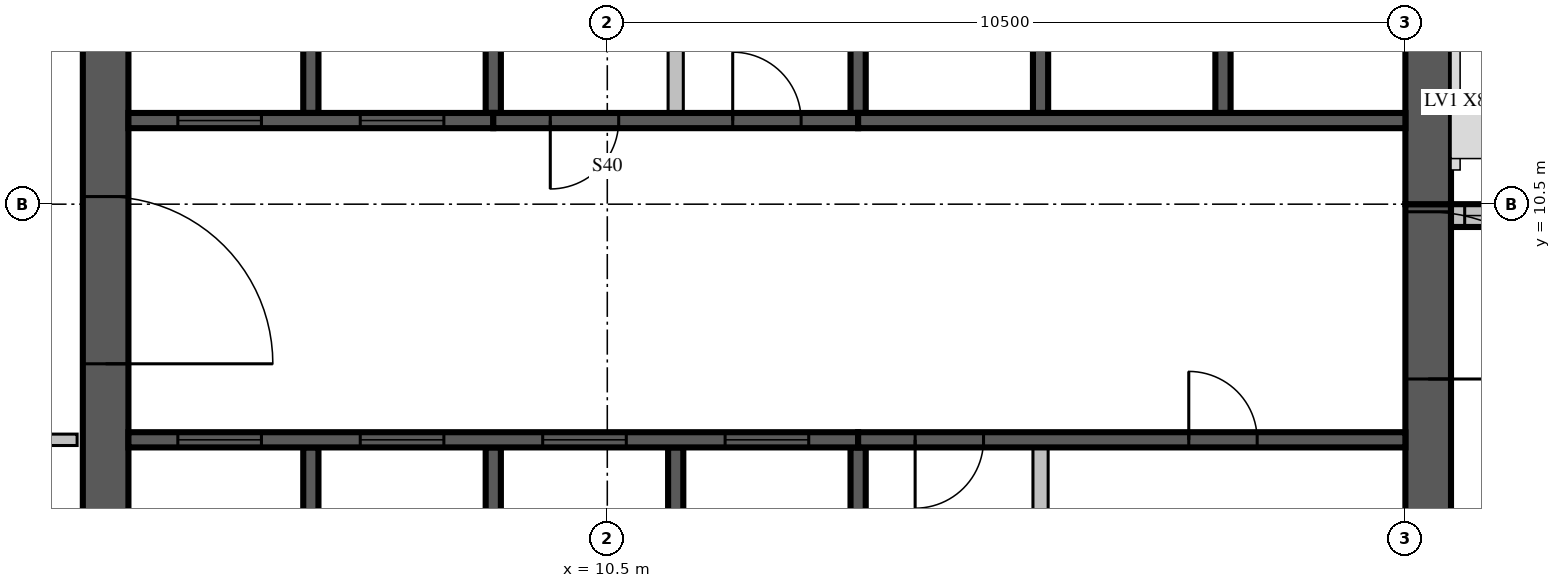
"""IFC4 building model, lengths in metres.
Left out: names, types, materials, properties, quantities, classifications, styles, units other than length and angle.
Written with IfcOpenShell. Run it as: python <this file> out.ifc"""

import sys

from ifc_helpers import new_model, si_unit, direction, frame, frame_2d, origin, place, context, subcontext, project, spatial, rectangle, extrude, source, transform, mapped, element, fill, save


model = new_model("IFC4")
c1 = context("Model", 3, precision=1e-05, world=origin(), true_north=direction((0.0, 1.0)))
c2 = subcontext(c1, "Body", "Model", "MODEL_VIEW")
j1 = project(units=[si_unit("LENGTHUNIT", "METRE"), si_unit("PLANEANGLEUNIT", "RADIAN")], contexts=[c1])
p1 = place(None, origin())
s1 = spatial("IfcSite", under=j1, at=p1, CompositionType="ELEMENT")
p2 = place(p1, origin())
s2 = spatial("IfcBuilding", under=s1, at=p2, CompositionType="ELEMENT")
p3 = place(p2, frame((0.0, 0.0, 354.5)))
s3 = spatial("IfcBuildingStorey", under=s2, at=p3, CompositionType="ELEMENT", Elevation=354.5)
m1 = source(origin(), c2, "Body", "SweptSolid", [
    extrude(rectangle(XDim=17.4, YDim=0.6, at=frame_2d((8.7, 0.0))), origin(), (0.0, 0.0, 1.0), 3.5),
])
p4 = place(p3, frame((3.9, 4.2, 0.0), z_axis=(0.0, 0.0, 1.0), x_axis=(0.0, 1.0, 0.0)))
e1 = element("IfcWall", 1, at=p4, inside=s3, PredefinedType="SHEAR", context=c2, shape_type="MappedRepresentation", body=[
    mapped(m1, transform((0.0, 0.0, 0.0), scale=1.0)),
])
m2 = source(origin(), c2, "Body", "SweptSolid", [
    extrude(rectangle(XDim=2.2, YDim=2.1, at=frame_2d((1.1, 1.05))), frame((0.0, 0.31, 0.0), z_axis=(0.0, -1.0, 0.0), x_axis=(1.0, 0.0, 0.0)), (0.0, 0.0, 1.0), 0.62),
])
p5 = place(p4, frame((4.2, 0.0, 0.0)))
e2 = element("IfcOpeningElement", 2, at=p5, cuts=e1, PredefinedType="OPENING", context=c2, shape_type="MappedRepresentation", body=[
    mapped(m2, transform((0.0, 0.0, 0.0), scale=1.0)),
])
m3 = source(origin(), c2, "Body", "SweptSolid", [
    extrude(rectangle(XDim=6.3, YDim=0.6, at=frame_2d((3.15, 0.0))), origin(), (0.0, 0.0, 1.0), 3.5),
])
p6 = place(p3, frame((21.3, 4.2, 0.0), z_axis=(0.0, 0.0, 1.0), x_axis=(0.0, 1.0, 0.0)))
e3 = element("IfcWall", 3, at=p6, inside=s3, PredefinedType="SHEAR", context=c2, shape_type="MappedRepresentation", body=[
    mapped(m3, transform((0.0, 0.0, 0.0), scale=1.0)),
])
p7 = place(p6, frame((4.0, 0.0, 0.0)))
e4 = element("IfcOpeningElement", 4, at=p7, cuts=e3, PredefinedType="OPENING", context=c2, shape_type="MappedRepresentation", body=[
    mapped(m2, transform((0.0, 0.0, 0.0), scale=1.0)),
])
m4 = source(origin(), c2, "Body", "SweptSolid", [
    extrude(rectangle(XDim=10.5, YDim=0.6, at=frame_2d((5.25, 0.0))), origin(), (0.0, 0.0, 1.0), 3.5),
])
p8 = place(p3, frame((21.3, 10.5, 0.0), z_axis=(0.0, 0.0, 1.0), x_axis=(0.0, 1.0, 0.0)))
e5 = element("IfcWall", 5, at=p8, inside=s3, PredefinedType="SHEAR", context=c2, shape_type="MappedRepresentation", body=[
    mapped(m4, transform((0.0, 0.0, 0.0), scale=1.0)),
])
m5 = source(origin(), c2, "Body", "SweptSolid", [
    extrude(rectangle(XDim=1.2, YDim=2.4, at=frame_2d((0.6, 1.2))), frame((0.0, 0.31, 0.0), z_axis=(0.0, -1.0, 0.0), x_axis=(1.0, 0.0, 0.0)), (0.0, 0.0, 1.0), 0.62),
])
p9 = place(p8, frame((5.7, 0.0, 0.6)))
e6 = element("IfcOpeningElement", 6, at=p9, cuts=e5, PredefinedType="OPENING", context=c2, shape_type="MappedRepresentation", body=[
    mapped(m5, transform((0.0, 0.0, 0.0), scale=1.0)),
])
m6 = source(origin(), c2, "Body", "SweptSolid", [
    extrude(rectangle(XDim=7.5, YDim=0.3, at=frame_2d((3.75, 0.0))), origin(), (0.0, 0.0, 1.0), 3.1),
])
p10 = place(p3, frame((29.1, 10.35, 0.0), z_axis=(0.0, 0.0, 1.0), x_axis=(-1.0, 0.0, 0.0)))
e7 = element("IfcWall", 7, at=p10, inside=s3, PredefinedType="STANDARD", context=c2, shape_type="MappedRepresentation", body=[
    mapped(m6, transform((0.0, 0.0, 0.0), scale=1.0)),
])
m7 = source(origin(), c2, "Body", "SweptSolid", [
    extrude(rectangle(XDim=3.0, YDim=2.0, at=frame_2d((1.5, 1.0))), frame((0.0, 0.16, 0.0), z_axis=(0.0, -1.0, 0.0), x_axis=(1.0, 0.0, 0.0)), (0.0, 0.0, 1.0), 0.32),
])
p11 = place(p10, frame((1.14, 0.0, 0.6)))
e8 = element("IfcOpeningElement", 8, at=p11, cuts=e7, PredefinedType="OPENING", context=c2, shape_type="MappedRepresentation", body=[
    mapped(m7, transform((0.0, 0.0, 0.0), scale=1.0)),
])
m8 = source(origin(), c2, "Body", "SweptSolid", [
    extrude(rectangle(XDim=1.8, YDim=2.0, at=frame_2d((0.9, 1.0))), frame((0.0, 0.16, 0.0), z_axis=(0.0, -1.0, 0.0), x_axis=(1.0, 0.0, 0.0)), (0.0, 0.0, 1.0), 0.32),
])
p12 = place(p10, frame((5.52, 0.0, 0.6)))
e9 = element("IfcOpeningElement", 9, at=p12, cuts=e7, PredefinedType="OPENING", context=c2, shape_type="MappedRepresentation", body=[
    mapped(m8, transform((0.0, 0.0, 0.0), scale=1.0)),
])
m9 = source(origin(), c2, "Body", "SweptSolid", [
    extrude(rectangle(XDim=3.1, YDim=0.2, at=frame_2d((1.55, 0.0))), origin(), (0.0, 0.0, 1.0), 3.5),
])
for number, where, z_axis, x_axis in (
    (10, (6.6, 4.2, 0.0), (0.0, 0.0, 1.0), (0.0, 1.0, 0.0)),
    (11, (9.0, 4.2, 0.0), (0.0, 0.0, 1.0), (0.0, 1.0, 0.0)),
    (12, (11.4, 4.2, 0.0), (0.0, 0.0, 1.0), (0.0, 1.0, 0.0)),
):
    element("IfcWall", number, at=place(p3, frame(where, z_axis=z_axis, x_axis=x_axis)), inside=s3, PredefinedType="SOLIDWALL", context=c2, shape_type="MappedRepresentation", body=[
        mapped(m9, transform((0.0, 0.0, 0.0), scale=1.0)),
    ])
m10 = source(origin(), c2, "Body", "SweptSolid", [
    extrude(rectangle(XDim=3.1, YDim=0.2, at=frame_2d((1.55, 0.0))), origin(), (0.0, 0.0, 1.0), 3.1),
])
p13 = place(p3, frame((13.8, 4.2, 0.0), z_axis=(0.0, 0.0, 1.0), x_axis=(0.0, 1.0, 0.0)))
e13 = element("IfcWall", 13, at=p13, inside=s3, PredefinedType="SOLIDWALL", context=c2, shape_type="MappedRepresentation", body=[
    mapped(m10, transform((0.0, 0.0, 0.0), scale=1.0)),
])
m11 = source(origin(), c2, "Body", "SweptSolid", [
    extrude(rectangle(XDim=3.1, YDim=0.2, at=frame_2d((1.55, 0.0))), origin(), (0.0, 0.0, 1.0), 3.1),
])
p14 = place(p3, frame((16.2, 4.2, 0.0), z_axis=(0.0, 0.0, 1.0), x_axis=(0.0, 1.0, 0.0)))
e14 = element("IfcWall", 14, at=p14, inside=s3, PredefinedType="PARTITIONING", context=c2, shape_type="MappedRepresentation", body=[
    mapped(m11, transform((0.0, 0.0, 0.0), scale=1.0)),
])
m12 = source(origin(), c2, "Body", "SweptSolid", [
    extrude(rectangle(XDim=3.0, YDim=0.2, at=frame_2d((1.5, 0.0))), origin(), (0.0, 0.0, 1.0), 3.5),
])
p15 = place(p3, frame((6.6, 11.7, 0.0), z_axis=(0.0, 0.0, 1.0), x_axis=(0.0, 1.0, 0.0)))
e15 = element("IfcWall", 15, at=p15, inside=s3, PredefinedType="SOLIDWALL", context=c2, shape_type="MappedRepresentation", body=[
    mapped(m12, transform((0.0, 0.0, 0.0), scale=1.0)),
])
m13 = source(origin(), c2, "Body", "SweptSolid", [
    extrude(rectangle(XDim=3.0, YDim=0.2, at=frame_2d((1.5, 0.0))), origin(), (0.0, 0.0, 1.0), 3.1),
])
for number, where, z_axis, x_axis in (
    (16, (9.0, 11.7, 0.0), (0.0, 0.0, 1.0), (0.0, 1.0, 0.0)),
    (17, (13.8, 11.7, 0.0), (0.0, 0.0, 1.0), (0.0, 1.0, 0.0)),
):
    element("IfcWall", number, at=place(p3, frame(where, z_axis=z_axis, x_axis=x_axis)), inside=s3, PredefinedType="SOLIDWALL", context=c2, shape_type="MappedRepresentation", body=[
        mapped(m13, transform((0.0, 0.0, 0.0), scale=1.0)),
    ])
for number, where, z_axis, x_axis in (
    (18, (16.2, 11.7, 0.0), (0.0, 0.0, 1.0), (0.0, 1.0, 0.0)),
    (19, (18.6, 11.7, 0.0), (0.0, 0.0, 1.0), (0.0, 1.0, 0.0)),
):
    element("IfcWall", number, at=place(p3, frame(where, z_axis=z_axis, x_axis=x_axis)), inside=s3, PredefinedType="SOLIDWALL", context=c2, shape_type="MappedRepresentation", body=[
        mapped(m12, transform((0.0, 0.0, 0.0), scale=1.0)),
    ])
m14 = source(origin(), c2, "Body", "SweptSolid", [
    extrude(rectangle(XDim=3.0, YDim=0.2, at=frame_2d((1.5, 0.0))), origin(), (0.0, 0.0, 1.0), 3.1),
])
p16 = place(p3, frame((11.4, 11.7, 0.0), z_axis=(0.0, 0.0, 1.0), x_axis=(0.0, 1.0, 0.0)))
e20 = element("IfcWall", 20, at=p16, inside=s3, PredefinedType="PARTITIONING", context=c2, shape_type="MappedRepresentation", body=[
    mapped(m14, transform((0.0, 0.0, 0.0), scale=1.0)),
])
m15 = source(origin(), c2, "Body", "SweptSolid", [
    extrude(rectangle(XDim=9.6, YDim=0.2, at=frame_2d((4.8, 0.0))), origin(), (0.0, 0.0, 1.0), 3.5),
])
p17 = place(p3, frame((4.2, 7.4, 0.0), z_axis=(0.0, 0.0, 1.0), x_axis=(1.0, 0.0, 0.0)))
e21 = element("IfcWall", 21, at=p17, inside=s3, PredefinedType="SOLIDWALL", context=c2, shape_type="MappedRepresentation", body=[
    mapped(m15, transform((0.0, 0.0, 0.0), scale=1.0)),
])
m16 = source(origin(), c2, "Body", "SweptSolid", [
    extrude(rectangle(XDim=1.1, YDim=2.1, at=frame_2d((0.55, 1.05))), frame((0.0, 0.11, 0.0), z_axis=(0.0, -1.0, 0.0), x_axis=(1.0, 0.0, 0.0)), (0.0, 0.0, 1.0), 0.22),
])
p18 = place(p17, frame((0.65, 0.0, 0.0)))
e22 = element("IfcOpeningElement", 22, at=p18, cuts=e21, PredefinedType="OPENING", context=c2, shape_type="MappedRepresentation", body=[
    mapped(m16, transform((0.0, 0.0, 0.0), scale=1.0)),
])
p19 = place(p17, frame((3.05, 0.0, 0.0)))
e23 = element("IfcOpeningElement", 23, at=p19, cuts=e21, PredefinedType="OPENING", context=c2, shape_type="MappedRepresentation", body=[
    mapped(m16, transform((0.0, 0.0, 0.0), scale=1.0)),
])
p20 = place(p17, frame((5.45, 0.0, 0.0)))
e24 = element("IfcOpeningElement", 24, at=p20, cuts=e21, PredefinedType="OPENING", context=c2, shape_type="MappedRepresentation", body=[
    mapped(m16, transform((0.0, 0.0, 0.0), scale=1.0)),
])
p21 = place(p17, frame((7.85, 0.0, 0.0)))
e25 = element("IfcOpeningElement", 25, at=p21, cuts=e21, PredefinedType="OPENING", context=c2, shape_type="MappedRepresentation", body=[
    mapped(m16, transform((0.0, 0.0, 0.0), scale=1.0)),
])
m17 = source(origin(), c2, "Body", "SweptSolid", [
    extrude(rectangle(XDim=7.2, YDim=0.2, at=frame_2d((3.6, 0.0))), origin(), (0.0, 0.0, 1.0), 3.1),
])
p22 = place(p3, frame((13.8, 7.4, 0.0), z_axis=(0.0, 0.0, 1.0), x_axis=(1.0, 0.0, 0.0)))
e26 = element("IfcWall", 26, at=p22, inside=s3, PredefinedType="SOLIDWALL", context=c2, shape_type="MappedRepresentation", body=[
    mapped(m17, transform((0.0, 0.0, 0.0), scale=1.0)),
])
m18 = source(origin(), c2, "Body", "SweptSolid", [
    extrude(rectangle(XDim=0.9, YDim=2.1, at=frame_2d((0.45, 1.05))), frame((0.0, 0.11, 0.0), z_axis=(0.0, -1.0, 0.0), x_axis=(1.0, 0.0, 0.0)), (0.0, 0.0, 1.0), 0.22),
])
p23 = place(p22, frame((0.75, 0.0, 0.0)))
e27 = element("IfcOpeningElement", 27, at=p23, cuts=e26, PredefinedType="OPENING", context=c2, shape_type="MappedRepresentation", body=[
    mapped(m18, transform((0.0, 0.0, 0.0), scale=1.0)),
])
p24 = place(p22, frame((4.35, 0.0, 0.0)))
e28 = element("IfcOpeningElement", 28, at=p24, cuts=e26, PredefinedType="OPENING", context=c2, shape_type="MappedRepresentation", body=[
    mapped(m18, transform((0.0, 0.0, 0.0), scale=1.0)),
])
m19 = source(origin(), c2, "Body", "SweptSolid", [
    extrude(rectangle(XDim=4.8, YDim=0.2, at=frame_2d((2.4, 0.0))), origin(), (0.0, 0.0, 1.0), 3.5),
])
p25 = place(p3, frame((4.2, 11.6, 0.0), z_axis=(0.0, 0.0, 1.0), x_axis=(1.0, 0.0, 0.0)))
e29 = element("IfcWall", 29, at=p25, inside=s3, PredefinedType="SOLIDWALL", context=c2, shape_type="MappedRepresentation", body=[
    mapped(m19, transform((0.0, 0.0, 0.0), scale=1.0)),
])
p26 = place(p25, frame((0.65, 0.0, 0.0)))
e30 = element("IfcOpeningElement", 30, at=p26, cuts=e29, PredefinedType="OPENING", context=c2, shape_type="MappedRepresentation", body=[
    mapped(m16, transform((0.0, 0.0, 0.0), scale=1.0)),
])
p27 = place(p25, frame((3.05, 0.0, 0.0)))
e31 = element("IfcOpeningElement", 31, at=p27, cuts=e29, PredefinedType="OPENING", context=c2, shape_type="MappedRepresentation", body=[
    mapped(m16, transform((0.0, 0.0, 0.0), scale=1.0)),
])
m20 = source(origin(), c2, "Body", "SweptSolid", [
    extrude(rectangle(XDim=4.8, YDim=0.2, at=frame_2d((2.4, 0.0))), origin(), (0.0, 0.0, 1.0), 3.1),
])
p28 = place(p3, frame((9.0, 11.6, 0.0), z_axis=(0.0, 0.0, 1.0), x_axis=(1.0, 0.0, 0.0)))
e32 = element("IfcWall", 32, at=p28, inside=s3, PredefinedType="SOLIDWALL", context=c2, shape_type="MappedRepresentation", body=[
    mapped(m20, transform((0.0, 0.0, 0.0), scale=1.0)),
])
p29 = place(p28, frame((0.75, 0.0, 0.0)))
e33 = element("IfcOpeningElement", 33, at=p29, cuts=e32, PredefinedType="OPENING", context=c2, shape_type="MappedRepresentation", body=[
    mapped(m18, transform((0.0, 0.0, 0.0), scale=1.0)),
])
p30 = place(p28, frame((3.15, 0.0, 0.0)))
e34 = element("IfcOpeningElement", 34, at=p30, cuts=e32, PredefinedType="OPENING", context=c2, shape_type="MappedRepresentation", body=[
    mapped(m18, transform((0.0, 0.0, 0.0), scale=1.0)),
])
m21 = source(origin(), c2, "Body", "SweptSolid", [
    extrude(rectangle(XDim=7.2, YDim=0.2, at=frame_2d((3.6, 0.0))), origin(), (0.0, 0.0, 1.0), 3.5),
])
p31 = place(p3, frame((13.8, 11.6, 0.0), z_axis=(0.0, 0.0, 1.0), x_axis=(1.0, 0.0, 0.0)))
e35 = element("IfcWall", 35, at=p31, inside=s3, PredefinedType="SOLIDWALL", context=c2, shape_type="MappedRepresentation", body=[
    mapped(m21, transform((0.0, 0.0, 0.0), scale=1.0)),
])
m22 = source(origin(), c2, "Body", "SweptSolid", [
    extrude(rectangle(XDim=3.225, YDim=0.15, at=frame_2d((1.613, 0.0))), origin(), (0.0, 0.0, 1.0), 3.1),
])
p32 = place(p3, frame((0.3, 7.4, 0.0), z_axis=(0.0, 0.0, 1.0), x_axis=(1.0, 0.0, 0.0)))
e36 = element("IfcWall", 36, at=p32, inside=s3, PredefinedType="PARTITIONING", context=c2, shape_type="MappedRepresentation", body=[
    mapped(m22, transform((0.0, 0.0, 0.0), scale=1.0)),
])
m23 = source(origin(), c2, "Body", "SweptSolid", [
    extrude(rectangle(XDim=0.9, YDim=2.1, at=frame_2d((0.45, 1.05))), frame((0.0, 0.085, 0.0), z_axis=(0.0, -1.0, 0.0), x_axis=(1.0, 0.0, 0.0)), (0.0, 0.0, 1.0), 0.17),
])
p33 = place(p32, frame((1.2, 0.0, 0.0)))
e37 = element("IfcOpeningElement", 37, at=p33, cuts=e36, PredefinedType="OPENING", context=c2, shape_type="MappedRepresentation", body=[
    mapped(m23, transform((0.0, 0.0, 0.0), scale=1.0)),
])
m24 = source(origin(), c2, "Body", "SweptSolid", [
    extrude(rectangle(XDim=1.8, YDim=2.0, at=frame_2d((0.9, 1.0))), frame((0.0, 0.03, 0.0), z_axis=(0.0, -1.0, 0.0), x_axis=(1.0, 0.0, 0.0)), (0.0, 0.0, 1.0), 0.06),
])
p34 = place(p12, origin())
e38 = element("IfcWindow", 38, at=p34, inside=s3, PartitioningType="SINGLE_PANEL", PredefinedType="WINDOW", context=c2, shape_type="MappedRepresentation", body=[
    mapped(m24, transform((0.0, 0.0, 0.0), scale=1.0)),
])
fill(e9, e38)
m25 = source(origin(), c2, "Body", "SweptSolid", [
    extrude(rectangle(XDim=1.1, YDim=2.1, at=frame_2d((0.55, 1.05))), frame((0.0, 0.025, 0.0), z_axis=(0.0, -1.0, 0.0), x_axis=(1.0, 0.0, 0.0)), (0.0, 0.0, 1.0), 0.05),
])
p35 = place(p18, origin())
e39 = element("IfcDoor", 39, at=p35, inside=s3, OperationType="SLIDING_TO_LEFT", PredefinedType="DOOR", context=c2, shape_type="MappedRepresentation", body=[
    mapped(m25, transform((0.0, 0.0, 0.0), scale=1.0)),
])
fill(e22, e39)
p36 = place(p19, origin())
e40 = element("IfcDoor", 40, at=p36, inside=s3, OperationType="SLIDING_TO_LEFT", PredefinedType="DOOR", context=c2, shape_type="MappedRepresentation", body=[
    mapped(m25, transform((0.0, 0.0, 0.0), scale=1.0)),
])
fill(e23, e40)
p37 = place(p20, origin())
e41 = element("IfcDoor", 41, at=p37, inside=s3, OperationType="SLIDING_TO_LEFT", PredefinedType="DOOR", context=c2, shape_type="MappedRepresentation", body=[
    mapped(m25, transform((0.0, 0.0, 0.0), scale=1.0)),
])
fill(e24, e41)
p38 = place(p21, origin())
e42 = element("IfcDoor", 42, at=p38, inside=s3, OperationType="SLIDING_TO_LEFT", PredefinedType="DOOR", context=c2, shape_type="MappedRepresentation", body=[
    mapped(m25, transform((0.0, 0.0, 0.0), scale=1.0)),
])
fill(e25, e42)
m26 = source(origin(), c2, "Body", "SweptSolid", [
    extrude(rectangle(XDim=0.9, YDim=2.1, at=frame_2d((0.45, 1.05))), frame((0.0, 0.025, 0.0), z_axis=(0.0, -1.0, 0.0), x_axis=(1.0, 0.0, 0.0)), (0.0, 0.0, 1.0), 0.05),
])
p39 = place(p23, origin())
e43 = element("IfcDoor", 43, at=p39, inside=s3, OperationType="SINGLE_SWING_RIGHT", PredefinedType="DOOR", context=c2, shape_type="MappedRepresentation", body=[
    mapped(m26, transform((0.0, 0.0, 0.0), scale=1.0)),
])
fill(e27, e43)
p40 = place(p24, origin())
e44 = element("IfcDoor", 44, at=p40, inside=s3, OperationType="SINGLE_SWING_LEFT", PredefinedType="DOOR", context=c2, shape_type="MappedRepresentation", body=[
    mapped(m26, transform((0.0, 0.0, 0.0), scale=1.0)),
])
fill(e28, e44)
p41 = place(p26, origin())
e45 = element("IfcDoor", 45, at=p41, inside=s3, OperationType="SLIDING_TO_LEFT", PredefinedType="DOOR", context=c2, shape_type="MappedRepresentation", body=[
    mapped(m25, transform((0.0, 0.0, 0.0), scale=1.0)),
])
fill(e30, e45)
p42 = place(p27, origin())
e46 = element("IfcDoor", 46, at=p42, inside=s3, OperationType="SLIDING_TO_LEFT", PredefinedType="DOOR", context=c2, shape_type="MappedRepresentation", body=[
    mapped(m25, transform((0.0, 0.0, 0.0), scale=1.0)),
])
fill(e31, e46)
p43 = place(p29, origin())
e47 = element("IfcDoor", 47, at=p43, inside=s3, OperationType="SINGLE_SWING_RIGHT", PredefinedType="DOOR", context=c2, shape_type="MappedRepresentation", body=[
    mapped(m26, transform((0.0, 0.0, 0.0), scale=1.0)),
])
fill(e33, e47)
p44 = place(p30, origin())
e48 = element("IfcDoor", 48, at=p44, inside=s3, OperationType="SINGLE_SWING_LEFT", PredefinedType="DOOR", context=c2, shape_type="MappedRepresentation", body=[
    mapped(m26, transform((0.0, 0.0, 0.0), scale=1.0)),
])
fill(e34, e48)
m27 = source(origin(), c2, "Body", "SweptSolid", [
    extrude(rectangle(XDim=2.2, YDim=2.1, at=frame_2d((1.1, 1.05))), frame((0.0, 0.025, 0.0), z_axis=(0.0, -1.0, 0.0), x_axis=(1.0, 0.0, 0.0)), (0.0, 0.0, 1.0), 0.05),
])
p45 = place(p7, origin())
e49 = element("IfcDoor", 49, at=p45, inside=s3, OperationType="DOUBLE_DOOR_SINGLE_SWING", PredefinedType="DOOR", context=c2, shape_type="MappedRepresentation", body=[
    mapped(m27, transform((0.0, 0.0, 0.0), scale=1.0)),
])
fill(e4, e49)
p46 = place(p5, origin())
e50 = element("IfcDoor", 50, at=p46, inside=s3, OperationType="DOUBLE_DOOR_SINGLE_SWING", PredefinedType="DOOR", context=c2, shape_type="MappedRepresentation", body=[
    mapped(m27, transform((0.0, 0.0, 0.0), scale=1.0)),
])
fill(e2, e50)
save(model, sys.argv[1])
